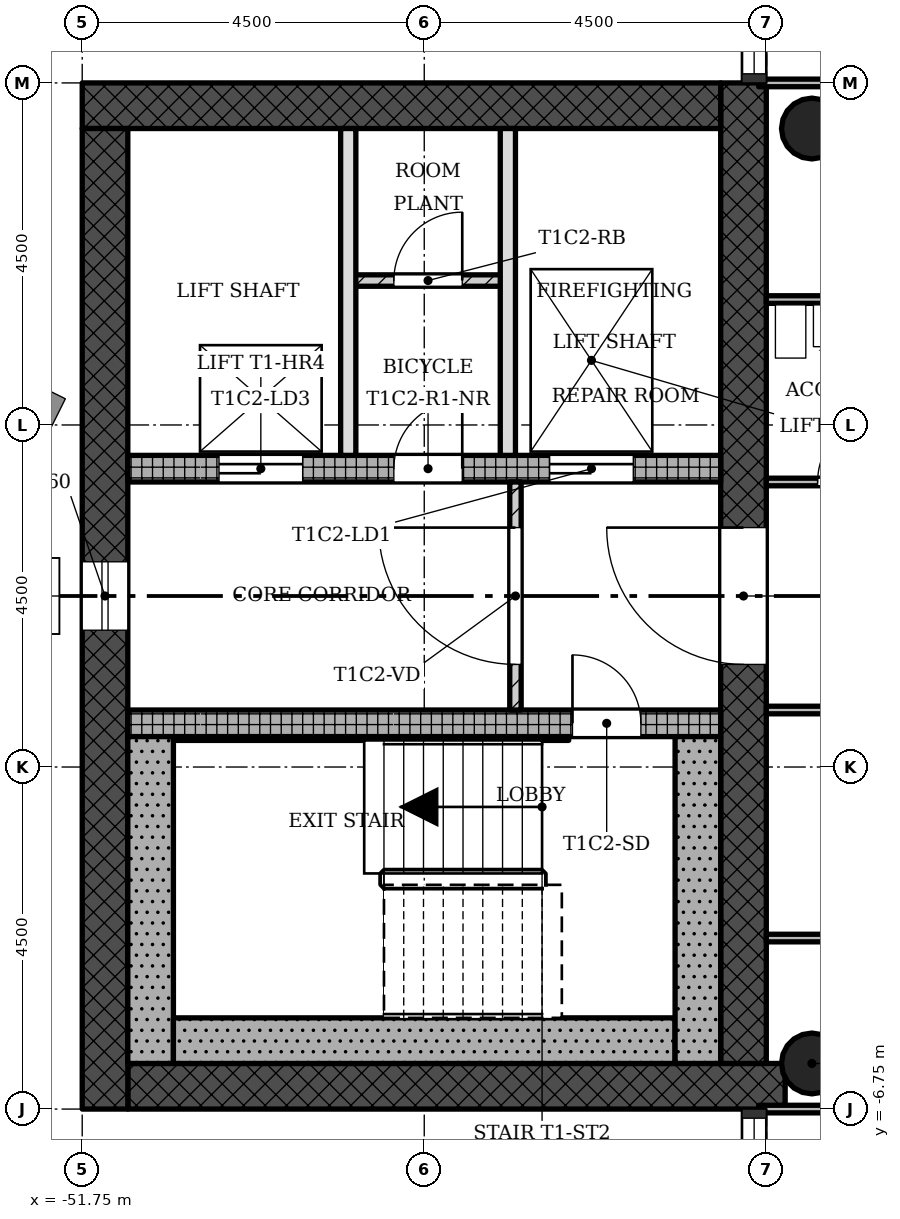
"""IFC4 building model, lengths in metres.
Left out: names, types, materials, properties, quantities, classifications, styles, units other than length and angle.
Written with IfcOpenShell. Run it as: python <this file> out.ifc"""

import sys

from ifc_helpers import new_model, si_unit, direction, frame, frame_2d, origin, origin_2d, place, context, subcontext, project, spatial, rectangle, hollow_circle, extrude, element, fill, save


model = new_model("IFC4")
c1 = context("Model", 3, precision=1e-05, world=origin(), true_north=direction((0.0, 1.0)))
c2 = subcontext(c1, "Body", "Model", "MODEL_VIEW")
j1 = project(units=[si_unit("LENGTHUNIT", "METRE"), si_unit("PLANEANGLEUNIT", "RADIAN")], contexts=[c1])
p1 = place(None, origin())
s1 = spatial("IfcSite", under=j1, at=p1, CompositionType="ELEMENT")
p2 = place(p1, origin())
s2 = spatial("IfcBuilding", under=s1, at=p2, CompositionType="ELEMENT")
p3 = place(p2, frame((0.0, 0.0, 216.4)))
s3 = spatial("IfcBuildingStorey", under=s2, at=p3, CompositionType="ELEMENT", Elevation=216.4)
p4 = place(p3, frame((-51.15, -6.45, 0.0), z_axis=(0.0, 0.0, 1.0), x_axis=(1.0, 0.0, 0.0)))
e1 = element("IfcWall", 1, at=p4, inside=s3, PredefinedType="SHEAR", context=c2, shape_type="SweptSolid", body=[
    extrude(rectangle(XDim=8.648, YDim=0.6, at=frame_2d((4.324, 0.0))), origin(), (0.0, 0.0, 1.0), 3.4),
])
p5 = place(p3, frame((-43.05, -6.15, 0.0), z_axis=(0.0, 0.0, 1.0), x_axis=(0.0, 1.0, 0.0)))
e2 = element("IfcWall", 2, at=p5, inside=s3, PredefinedType="SHEAR", context=c2, shape_type="SweptSolid", body=[
    extrude(rectangle(XDim=12.9, YDim=0.6, at=frame_2d((6.45, 0.0))), origin(), (0.0, 0.0, 1.0), 3.4),
])
p6 = place(p5, frame((5.25, 0.0, 0.0)))
e3 = element("IfcOpeningElement", 3, at=p6, cuts=e2, PredefinedType="OPENING", context=c2, shape_type="SweptSolid", body=[
    extrude(rectangle(XDim=1.8, YDim=2.1, at=frame_2d((0.9, 1.05))), frame((0.0, 0.31, 0.0), z_axis=(0.0, -1.0, 0.0), x_axis=(1.0, 0.0, 0.0)), (0.0, 0.0, 1.0), 0.62),
])
p7 = place(p3, frame((-43.35, 6.45, 0.0), z_axis=(0.0, 0.0, 1.0), x_axis=(-1.0, 0.0, 0.0)))
e4 = element("IfcWall", 4, at=p7, inside=s3, PredefinedType="SHEAR", context=c2, shape_type="SweptSolid", body=[
    extrude(rectangle(XDim=8.4, YDim=0.6, at=frame_2d((4.2, 0.0))), origin(), (0.0, 0.0, 1.0), 3.4),
])
p8 = place(p3, frame((-51.45, 6.15, 0.0), z_axis=(0.0, 0.0, 1.0), x_axis=(0.0, -1.0, 0.0)))
e5 = element("IfcWall", 5, at=p8, inside=s3, PredefinedType="SHEAR", context=c2, shape_type="SweptSolid", body=[
    extrude(rectangle(XDim=12.9, YDim=0.6, at=frame_2d((6.45, 0.0))), origin(), (0.0, 0.0, 1.0), 3.4),
])
p9 = place(p8, frame((5.7, 0.0, 0.45)))
e6 = element("IfcOpeningElement", 6, at=p9, cuts=e5, PredefinedType="OPENING", context=c2, shape_type="SweptSolid", body=[
    extrude(rectangle(XDim=0.9, YDim=2.4, at=frame_2d((0.45, 1.2))), frame((0.0, 0.31, 0.0), z_axis=(0.0, -1.0, 0.0), x_axis=(1.0, 0.0, 0.0)), (0.0, 0.0, 1.0), 0.62),
])
p10 = place(p3, frame((-51.15, -1.675, 0.0), z_axis=(0.0, 0.0, 1.0), x_axis=(1.0, 0.0, 0.0)))
e7 = element("IfcWall", 7, at=p10, inside=s3, PredefinedType="SHEAR", context=c2, shape_type="SweptSolid", body=[
    extrude(rectangle(XDim=7.8, YDim=0.35, at=frame_2d((3.9, 0.0))), origin(), (0.0, 0.0, 1.0), 3.4),
])
p11 = place(p10, frame((5.85, 0.0, 0.0)))
e8 = element("IfcOpeningElement", 8, at=p11, cuts=e7, PredefinedType="OPENING", context=c2, shape_type="SweptSolid", body=[
    extrude(rectangle(XDim=0.9, YDim=2.1, at=frame_2d((0.45, 1.05))), frame((0.0, 0.185, 0.0), z_axis=(0.0, -1.0, 0.0), x_axis=(1.0, 0.0, 0.0)), (0.0, 0.0, 1.0), 0.37),
])
p12 = place(p3, frame((-51.15, 1.675, 0.0), z_axis=(0.0, 0.0, 1.0), x_axis=(1.0, 0.0, 0.0)))
e9 = element("IfcWall", 9, at=p12, inside=s3, PredefinedType="SHEAR", context=c2, shape_type="SweptSolid", body=[
    extrude(rectangle(XDim=7.8, YDim=0.35, at=frame_2d((3.9, 0.0))), origin(), (0.0, 0.0, 1.0), 3.4),
])
p13 = place(p12, frame((5.55, 0.0, 0.0)))
e10 = element("IfcOpeningElement", 10, at=p13, cuts=e9, PredefinedType="OPENING", context=c2, shape_type="SweptSolid", body=[
    extrude(rectangle(XDim=1.1, YDim=2.1, at=frame_2d((0.55, 1.05))), frame((0.0, 0.185, 0.0), z_axis=(0.0, -1.0, 0.0), x_axis=(1.0, 0.0, 0.0)), (0.0, 0.0, 1.0), 0.37),
])
p14 = place(p12, frame((1.2, 0.0, 0.0)))
e11 = element("IfcOpeningElement", 11, at=p14, cuts=e9, PredefinedType="OPENING", context=c2, shape_type="SweptSolid", body=[
    extrude(rectangle(XDim=1.1, YDim=2.1, at=frame_2d((0.55, 1.05))), frame((0.0, 0.185, 0.0), z_axis=(0.0, -1.0, 0.0), x_axis=(1.0, 0.0, 0.0)), (0.0, 0.0, 1.0), 0.37),
])
p15 = place(p12, frame((3.5, 0.0, 0.0)))
e12 = element("IfcOpeningElement", 12, at=p15, cuts=e9, PredefinedType="OPENING", context=c2, shape_type="SweptSolid", body=[
    extrude(rectangle(XDim=0.9, YDim=2.1, at=frame_2d((0.45, 1.05))), frame((0.0, 0.185, 0.0), z_axis=(0.0, -1.0, 0.0), x_axis=(1.0, 0.0, 0.0)), (0.0, 0.0, 1.0), 0.37),
])
for number, where, z_axis, x_axis in (
    (13, (-42.15, -6.15, 0.0), (0.0, 0.0, 1.0), (1.0, 0.0, 0.0)),
    (14, (-42.15, 6.15, 0.0), (0.0, 0.0, 1.0), (1.0, 0.0, 0.0)),
):
    element("IfcColumn", number, at=place(p3, frame(where, z_axis=z_axis, x_axis=x_axis)), inside=s3, PredefinedType="COLUMN", context=c2, shape_type="SweptSolid", body=[
        extrude(hollow_circle(Radius=0.4, WallThickness=0.028, at=origin_2d()), origin(), (0.0, 0.0, 1.0), 3.4),
    ])
p16 = place(p3, frame((-46.05, 1.5, 0.0), z_axis=(0.0, 0.0, 1.0), x_axis=(0.0, -1.0, 0.0)))
e15 = element("IfcWall", 15, at=p16, inside=s3, PredefinedType="PARTITIONING", context=c2, shape_type="SweptSolid", body=[
    extrude(rectangle(XDim=3.0, YDim=0.15, at=frame_2d((1.5, 0.0))), origin(), (0.0, 0.0, 1.0), 3.0),
])
p17 = place(p16, frame((0.6, 0.0, 0.0)))
e16 = element("IfcOpeningElement", 16, at=p17, cuts=e15, PredefinedType="OPENING", context=c2, shape_type="SweptSolid", body=[
    extrude(rectangle(XDim=1.8, YDim=2.1, at=frame_2d((0.9, 1.05))), frame((0.0, 0.085, 0.0), z_axis=(0.0, -1.0, 0.0), x_axis=(1.0, 0.0, 0.0)), (0.0, 0.0, 1.0), 0.17),
])
for number, where, z_axis, x_axis in (
    (17, (-48.25, 6.15, 0.0), (0.0, 0.0, 1.0), (0.0, -1.0, 0.0)),
    (18, (-46.15, 6.15, 0.0), (0.0, 0.0, 1.0), (0.0, -1.0, 0.0)),
):
    element("IfcWall", number, at=place(p3, frame(where, z_axis=z_axis, x_axis=x_axis)), inside=s3, PredefinedType="SOLIDWALL", context=c2, shape_type="SweptSolid", body=[
        extrude(rectangle(XDim=4.3, YDim=0.2, at=frame_2d((2.15, 0.0))), origin(), (0.0, 0.0, 1.0), 3.0),
    ])
p18 = place(p3, frame((-46.15, 4.15, 0.0), z_axis=(0.0, 0.0, 1.0), x_axis=(-1.0, 0.0, 0.0)))
e19 = element("IfcWall", 19, at=p18, inside=s3, PredefinedType="PARTITIONING", context=c2, shape_type="SweptSolid", body=[
    extrude(rectangle(XDim=2.1, YDim=0.15, at=frame_2d((1.05, 0.0))), origin(), (0.0, 0.0, 1.0), 3.0),
])
p19 = place(p18, frame((0.6, 0.0, 0.0)))
e20 = element("IfcOpeningElement", 20, at=p19, cuts=e19, PredefinedType="OPENING", context=c2, shape_type="SweptSolid", body=[
    extrude(rectangle(XDim=0.9, YDim=2.1, at=frame_2d((0.45, 1.05))), frame((0.0, 0.085, 0.0), z_axis=(0.0, -1.0, 0.0), x_axis=(1.0, 0.0, 0.0)), (0.0, 0.0, 1.0), 0.17),
])
p20 = place(p3, frame((-42.85, -6.75, 0.0), z_axis=(0.0, 0.0, 1.0), x_axis=(1.0, 0.0, 0.0)))
e21 = element("IfcWall", 21, at=p20, inside=s3, PredefinedType="PARTITIONING", context=c2, shape_type="SweptSolid", body=[
    extrude(rectangle(XDim=5.95, YDim=0.1, at=frame_2d((2.975, 0.0))), origin(), (0.0, 0.0, 1.0), 3.0),
])
p21 = place(p3, frame((-42.75, -4.5, 0.0), z_axis=(0.0, 0.0, 1.0), x_axis=(1.0, 0.0, 0.0)))
e22 = element("IfcWall", 22, at=p21, inside=s3, PredefinedType="PARTITIONING", context=c2, shape_type="SweptSolid", body=[
    extrude(rectangle(XDim=5.85, YDim=0.1, at=frame_2d((2.925, 0.0))), origin(), (0.0, 0.0, 1.0), 3.0),
])
p22 = place(p21, frame((3.6, 0.0, 0.0)))
e23 = element("IfcOpeningElement", 23, at=p22, cuts=e22, PredefinedType="OPENING", context=c2, shape_type="SweptSolid", body=[
    extrude(rectangle(XDim=0.9, YDim=2.1, at=frame_2d((0.45, 1.05))), frame((0.0, 0.06, 0.0), z_axis=(0.0, -1.0, 0.0), x_axis=(1.0, 0.0, 0.0)), (0.0, 0.0, 1.0), 0.12),
])
p23 = place(p3, frame((-42.75, -1.5, 0.0), z_axis=(0.0, 0.0, 1.0), x_axis=(1.0, 0.0, 0.0)))
e24 = element("IfcWall", 24, at=p23, inside=s3, PredefinedType="PARTITIONING", context=c2, shape_type="SweptSolid", body=[
    extrude(rectangle(XDim=2.25, YDim=0.1, at=frame_2d((1.125, 0.0))), origin(), (0.0, 0.0, 1.0), 3.0),
])
p24 = place(p3, frame((-42.75, 1.5, 0.0), z_axis=(0.0, 0.0, 1.0), x_axis=(1.0, 0.0, 0.0)))
e25 = element("IfcWall", 25, at=p24, inside=s3, PredefinedType="PARTITIONING", context=c2, shape_type="SweptSolid", body=[
    extrude(rectangle(XDim=2.25, YDim=0.1, at=frame_2d((1.125, 0.0))), origin(), (0.0, 0.0, 1.0), 3.0),
])
p25 = place(p24, frame((0.675, 0.0, 0.0)))
e26 = element("IfcOpeningElement", 26, at=p25, cuts=e25, PredefinedType="OPENING", context=c2, shape_type="SweptSolid", body=[
    extrude(rectangle(XDim=0.9, YDim=2.1, at=frame_2d((0.45, 1.05))), frame((0.0, 0.06, 0.0), z_axis=(0.0, -1.0, 0.0), x_axis=(1.0, 0.0, 0.0)), (0.0, 0.0, 1.0), 0.12),
])
p26 = place(p3, frame((-42.75, 3.9, 0.0), z_axis=(0.0, 0.0, 1.0), x_axis=(1.0, 0.0, 0.0)))
e27 = element("IfcWall", 27, at=p26, inside=s3, PredefinedType="PARTITIONING", context=c2, shape_type="SweptSolid", body=[
    extrude(rectangle(XDim=2.25, YDim=0.1, at=frame_2d((1.125, 0.0))), origin(), (0.0, 0.0, 1.0), 3.0),
])
p27 = place(p3, frame((-42.85, 6.75, 0.0), z_axis=(0.0, 0.0, 1.0), x_axis=(1.0, 0.0, 0.0)))
e28 = element("IfcWall", 28, at=p27, inside=s3, PredefinedType="PARTITIONING", context=c2, shape_type="SweptSolid", body=[
    extrude(rectangle(XDim=5.95, YDim=0.1, at=frame_2d((2.975, 0.0))), origin(), (0.0, 0.0, 1.0), 3.0),
])
p28 = place(p3, frame((-50.85, -1.85, 0.0), z_axis=(0.0, 0.0, 1.0), x_axis=(0.0, -1.0, 0.0)))
e29 = element("IfcWall", 29, at=p28, inside=s3, PredefinedType="SHEAR", context=c2, shape_type="SweptSolid", body=[
    extrude(rectangle(XDim=4.3, YDim=0.6, at=frame_2d((2.15, 0.0))), origin(), (0.0, 0.0, 1.0), 3.4),
])
p29 = place(p3, frame((-43.95, -5.85, 0.0), z_axis=(0.0, 0.0, 1.0), x_axis=(-1.0, 0.0, 0.0)))
e30 = element("IfcWall", 30, at=p29, inside=s3, PredefinedType="SHEAR", context=c2, shape_type="SweptSolid", body=[
    extrude(rectangle(XDim=6.6, YDim=0.6, at=frame_2d((3.3, 0.0))), origin(), (0.0, 0.0, 1.0), 3.4),
])
p30 = place(p3, frame((-43.65, -1.85, 0.0), z_axis=(0.0, 0.0, 1.0), x_axis=(0.0, -1.0, 0.0)))
e31 = element("IfcWall", 31, at=p30, inside=s3, PredefinedType="SHEAR", context=c2, shape_type="SweptSolid", body=[
    extrude(rectangle(XDim=4.3, YDim=0.6, at=frame_2d((2.15, 0.0))), origin(), (0.0, 0.0, 1.0), 3.4),
])
p31 = place(p3, frame((-45.35, -1.875, 0.0), z_axis=(0.0, 0.0, 1.0), x_axis=(-1.0, 0.0, 0.0)))
e32 = element("IfcWall", 32, at=p31, inside=s3, PredefinedType="SHEAR", context=c2, shape_type="SweptSolid", body=[
    extrude(rectangle(XDim=5.2, YDim=0.05, at=frame_2d((2.6, 0.0))), origin(), (0.0, 0.0, 1.0), 3.4),
])
p32 = place(p9, origin())
e33 = element("IfcWindow", 33, at=p32, inside=s3, PartitioningType="SINGLE_PANEL", PredefinedType="WINDOW", context=c2, shape_type="SweptSolid", body=[
    extrude(rectangle(XDim=0.9, YDim=2.4, at=frame_2d((0.45, 1.2))), frame((0.0, 0.03, 0.0), z_axis=(0.0, -1.0, 0.0), x_axis=(1.0, 0.0, 0.0)), (0.0, 0.0, 1.0), 0.06),
])
fill(e6, e33)
p33 = place(p17, origin())
e34 = element("IfcDoor", 34, at=p33, inside=s3, OperationType="SINGLE_SWING_LEFT", PredefinedType="DOOR", context=c2, shape_type="SweptSolid", body=[
    extrude(rectangle(XDim=1.8, YDim=2.1, at=frame_2d((0.9, 1.05))), frame((0.0, 0.025, 0.0), z_axis=(0.0, -1.0, 0.0), x_axis=(1.0, 0.0, 0.0)), (0.0, 0.0, 1.0), 0.05),
])
fill(e16, e34)
p34 = place(p19, origin())
e35 = element("IfcDoor", 35, at=p34, inside=s3, OperationType="SINGLE_SWING_LEFT", PredefinedType="DOOR", context=c2, shape_type="SweptSolid", body=[
    extrude(rectangle(XDim=0.9, YDim=2.1, at=frame_2d((0.45, 1.05))), frame((0.0, 0.025, 0.0), z_axis=(0.0, -1.0, 0.0), x_axis=(1.0, 0.0, 0.0)), (0.0, 0.0, 1.0), 0.05),
])
fill(e20, e35)
p35 = place(p25, origin())
e36 = element("IfcDoor", 36, at=p35, inside=s3, OperationType="SINGLE_SWING_LEFT", PredefinedType="DOOR", context=c2, shape_type="SweptSolid", body=[
    extrude(rectangle(XDim=0.9, YDim=2.1, at=frame_2d((0.45, 1.05))), frame((0.0, 0.025, 0.0), z_axis=(0.0, -1.0, 0.0), x_axis=(1.0, 0.0, 0.0)), (0.0, 0.0, 1.0), 0.05),
])
fill(e26, e36)
p36 = place(p11, origin())
e37 = element("IfcDoor", 37, at=p36, inside=s3, OperationType="SINGLE_SWING_RIGHT", PredefinedType="DOOR", context=c2, shape_type="SweptSolid", body=[
    extrude(rectangle(XDim=0.9, YDim=2.1, at=frame_2d((0.45, 1.05))), frame((0.0, 0.025, 0.0), z_axis=(0.0, -1.0, 0.0), x_axis=(1.0, 0.0, 0.0)), (0.0, 0.0, 1.0), 0.05),
])
fill(e8, e37)
p37 = place(p13, origin())
e38 = element("IfcDoor", 38, at=p37, inside=s3, OperationType="SLIDING_TO_LEFT", PredefinedType="DOOR", context=c2, shape_type="SweptSolid", body=[
    extrude(rectangle(XDim=1.1, YDim=2.1, at=frame_2d((0.55, 1.05))), frame((0.0, 0.025, 0.0), z_axis=(0.0, -1.0, 0.0), x_axis=(1.0, 0.0, 0.0)), (0.0, 0.0, 1.0), 0.05),
])
fill(e10, e38)
p38 = place(p14, origin())
e39 = element("IfcDoor", 39, at=p38, inside=s3, OperationType="SLIDING_TO_LEFT", PredefinedType="DOOR", context=c2, shape_type="SweptSolid", body=[
    extrude(rectangle(XDim=1.1, YDim=2.1, at=frame_2d((0.55, 1.05))), frame((0.0, 0.025, 0.0), z_axis=(0.0, -1.0, 0.0), x_axis=(1.0, 0.0, 0.0)), (0.0, 0.0, 1.0), 0.05),
])
fill(e11, e39)
p39 = place(p15, origin())
e40 = element("IfcDoor", 40, at=p39, inside=s3, OperationType="SINGLE_SWING_LEFT", PredefinedType="DOOR", context=c2, shape_type="SweptSolid", body=[
    extrude(rectangle(XDim=0.9, YDim=2.1, at=frame_2d((0.45, 1.05))), frame((0.0, 0.025, 0.0), z_axis=(0.0, -1.0, 0.0), x_axis=(1.0, 0.0, 0.0)), (0.0, 0.0, 1.0), 0.05),
])
fill(e12, e40)
p40 = place(p6, origin())
e41 = element("IfcDoor", 41, at=p40, inside=s3, OperationType="SINGLE_SWING_LEFT", PredefinedType="DOOR", context=c2, shape_type="SweptSolid", body=[
    extrude(rectangle(XDim=1.8, YDim=2.1, at=frame_2d((0.9, 1.05))), frame((0.0, 0.025, 0.0), z_axis=(0.0, -1.0, 0.0), x_axis=(1.0, 0.0, 0.0)), (0.0, 0.0, 1.0), 0.05),
])
fill(e3, e41)
save(model, sys.argv[1])
